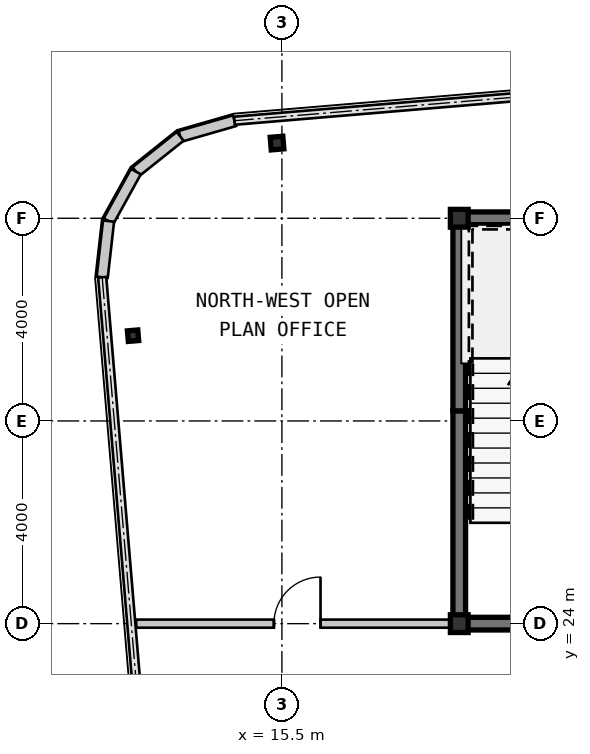
"""IFC4 building model, lengths in metres.
Left out: names, types, materials, properties, quantities, classifications, styles, units other than length and angle.
Written with IfcOpenShell. Run it as: python <this file> out.ifc"""

import sys

from ifc_helpers import new_model, si_unit, direction, frame, frame_2d, origin, origin_2d, place, context, subcontext, project, spatial, rectangle, hollow_rectangle, i_section, extrude, source, transform, mapped, element, fill, save


model = new_model("IFC4")
c1 = context("Model", 3, precision=1e-05, world=origin(), true_north=direction((0.0, 1.0)))
c2 = subcontext(c1, "Body", "Model", "MODEL_VIEW")
j1 = project(units=[si_unit("LENGTHUNIT", "METRE"), si_unit("PLANEANGLEUNIT", "RADIAN")], contexts=[c1])
p1 = place(None, origin())
s1 = spatial("IfcSite", under=j1, at=p1, CompositionType="ELEMENT")
p2 = place(p1, origin())
s2 = spatial("IfcBuilding", under=s1, at=p2, CompositionType="ELEMENT")
p3 = place(p2, frame((0.0, 0.0, 185.15)))
s3 = spatial("IfcBuildingStorey", under=s2, at=p3, CompositionType="ELEMENT", Elevation=185.15)
m1 = source(origin(), c2, "Body", "SweptSolid", [
    extrude(hollow_rectangle(XDim=0.35, YDim=0.35, WallThickness=0.016, at=origin_2d()), origin(), (0.0, 0.0, 1.0), 3.15),
])
for number, where, z_axis, x_axis in (
    (1, (19.0, 24.0, 0.0), (0.0, 0.0, 1.0), (1.0, 0.0, 0.0)),
    (2, (19.0, 32.0, 0.0), (0.0, 0.0, 1.0), (1.0, 0.0, 0.0)),
):
    element("IfcColumn", number, at=place(p3, frame(where, z_axis=z_axis, x_axis=x_axis)), inside=s3, PredefinedType="COLUMN", context=c2, shape_type="MappedRepresentation", body=[
        mapped(m1, transform((0.0, 0.0, 0.0), scale=1.0)),
    ])
m2 = source(origin(), c2, "Body", "SweptSolid", [
    extrude(hollow_rectangle(XDim=0.25, YDim=0.25, WallThickness=0.01, at=origin_2d()), origin(), (0.0, 0.0, 1.0), 3.15),
])
p4 = place(p3, frame((15.404, 33.484, 0.0), z_axis=(0.0, 0.0, 1.0), x_axis=(0.99649285925, 0.083677843332, 0.0)))
e3 = element("IfcColumn", 3, at=p4, inside=s3, PredefinedType="COLUMN", context=c2, shape_type="MappedRepresentation", body=[
    mapped(m2, transform((0.0, 0.0, 0.0), scale=1.0)),
])
m3 = source(origin(), c2, "Body", "SweptSolid", [
    extrude(i_section(OverallWidth=0.205, OverallDepth=0.21, WebThickness=0.009, FlangeThickness=0.014, at=origin_2d()), origin(), (0.0, 0.0, 1.0), 3.15),
])
p5 = place(p3, frame((12.562, 29.682, 0.0), z_axis=(0.0, 0.0, 1.0), x_axis=(0.99649285925, 0.083677843332, 0.0)))
e4 = element("IfcColumn", 4, at=p5, inside=s3, PredefinedType="COLUMN", context=c2, shape_type="MappedRepresentation", body=[
    mapped(m3, transform((0.0, 0.0, 0.0), scale=1.0)),
])
m4 = source(origin(), c2, "Body", "SweptSolid", [
    extrude(rectangle(XDim=1.116, YDim=0.22, at=frame_2d((0.558, 0.0))), origin(), (0.0, 0.0, 1.0), 2.93),
])
p6 = place(p3, frame((14.564, 33.925, 0.0), z_axis=(0.0, 0.0, 1.0), x_axis=(-0.961010464297, -0.276512002475, 0.0)))
e5 = element("IfcWall", 5, at=p6, inside=s3, PredefinedType="SOLIDWALL", context=c2, shape_type="MappedRepresentation", body=[
    mapped(m4, transform((0.0, 0.0, 0.0), scale=1.0)),
])
m5 = source(origin(), c2, "Body", "SweptSolid", [
    extrude(rectangle(XDim=1.116, YDim=0.22, at=frame_2d((0.558, 0.0))), origin(), (0.0, 0.0, 1.0), 2.93),
])
p7 = place(p3, frame((13.491, 33.616, 0.0), z_axis=(0.0, 0.0, 1.0), x_axis=(-0.782062884215, -0.623199522732, 0.0)))
e6 = element("IfcWall", 6, at=p7, inside=s3, PredefinedType="SOLIDWALL", context=c2, shape_type="MappedRepresentation", body=[
    mapped(m5, transform((0.0, 0.0, 0.0), scale=1.0)),
])
for number, where, z_axis, x_axis in (
    (7, (12.619, 32.921, 0.0), (0.0, 0.0, 1.0), (-0.484, -0.875, 0.0)),
    (8, (12.079, 31.944, 0.0), (0.0, 0.0, 1.0), (-0.112, -0.994, 0.0)),
):
    element("IfcWall", number, at=place(p3, frame(where, z_axis=z_axis, x_axis=x_axis)), inside=s3, PredefinedType="SOLIDWALL", context=c2, shape_type="MappedRepresentation", body=[
        mapped(m4, transform((0.0, 0.0, 0.0), scale=1.0)),
    ])
m6 = source(origin(), c2, "Body", "SweptSolid", [
    extrude(rectangle(XDim=9.125, YDim=0.25, at=frame_2d((4.562, 0.0))), origin(), (0.0, 0.0, 1.0), 2.93),
])
p8 = place(p3, frame((18.875, 32.0, 0.0), z_axis=(0.0, 0.0, 1.0), x_axis=(1.0, 0.0, 0.0)))
e9 = element("IfcWall", 9, at=p8, inside=s3, PredefinedType="SHEAR", context=c2, shape_type="MappedRepresentation", body=[
    mapped(m6, transform((0.0, 0.0, 0.0), scale=1.0)),
])
m7 = source(origin(), c2, "Body", "SweptSolid", [
    extrude(rectangle(XDim=4.075, YDim=0.25, at=frame_2d((2.038, 0.0))), origin(), (0.0, 0.0, 1.0), 2.93),
])
p9 = place(p3, frame((19.0, 24.125, 0.0), z_axis=(0.0, 0.0, 1.0), x_axis=(0.0, 1.0, 0.0)))
e10 = element("IfcWall", 10, at=p9, inside=s3, PredefinedType="SHEAR", context=c2, shape_type="MappedRepresentation", body=[
    mapped(m7, transform((0.0, 0.0, 0.0), scale=1.0)),
])
m8 = source(origin(), c2, "Body", "SweptSolid", [
    extrude(rectangle(XDim=3.675, YDim=0.25, at=frame_2d((1.837, 0.0))), origin(), (0.0, 0.0, 1.0), 2.93),
])
p10 = place(p3, frame((19.0, 28.2, 0.0), z_axis=(0.0, 0.0, 1.0), x_axis=(0.0, 1.0, 0.0)))
e11 = element("IfcWall", 11, at=p10, inside=s3, PredefinedType="SHEAR", context=c2, shape_type="MappedRepresentation", body=[
    mapped(m8, transform((0.0, 0.0, 0.0), scale=1.0)),
])
m9 = source(origin(), c2, "Body", "SweptSolid", [
    extrude(rectangle(XDim=4.85, YDim=0.25, at=frame_2d((2.425, 0.0))), origin(), (0.0, 0.0, 1.0), 2.93),
])
p11 = place(p3, frame((18.875, 24.0, 0.0), z_axis=(0.0, 0.0, 1.0), x_axis=(1.0, 0.0, 0.0)))
e12 = element("IfcWall", 12, at=p11, inside=s3, PredefinedType="SHEAR", context=c2, shape_type="MappedRepresentation", body=[
    mapped(m9, transform((0.0, 0.0, 0.0), scale=1.0)),
])
m10 = source(origin(), c2, "Body", "SweptSolid", [
    extrude(rectangle(XDim=6.251, YDim=0.16, at=frame_2d((3.125, 0.0))), origin(), (0.0, 0.0, 1.0), 2.93),
])
p12 = place(p3, frame((12.624, 24.0, 0.0), z_axis=(0.0, 0.0, 1.0), x_axis=(1.0, 0.0, 0.0)))
e13 = element("IfcWall", 13, at=p12, inside=s3, PredefinedType="PARTITIONING", context=c2, shape_type="MappedRepresentation", body=[
    mapped(m10, transform((0.0, 0.0, 0.0), scale=1.0)),
])
m11 = source(origin(), c2, "Body", "SweptSolid", [
    extrude(rectangle(XDim=0.92, YDim=2.1, at=frame_2d((0.46, 1.05))), frame((0.0, 0.09, 0.0), z_axis=(0.0, -1.0, 0.0), x_axis=(1.0, 0.0, 0.0)), (0.0, 0.0, 1.0), 0.18),
])
p13 = place(p12, frame((2.718, 0.0, 0.0)))
e14 = element("IfcOpeningElement", 14, at=p13, cuts=e13, PredefinedType="OPENING", context=c2, shape_type="MappedRepresentation", body=[
    mapped(m11, transform((0.0, 0.0, 0.0), scale=1.0)),
])
m12 = source(origin(), c2, "Body", "SweptSolid", [
    extrude(rectangle(XDim=0.92, YDim=2.1, at=frame_2d((0.46, 1.05))), frame((0.0, 0.025, 0.0), z_axis=(0.0, -1.0, 0.0), x_axis=(1.0, 0.0, 0.0)), (0.0, 0.0, 1.0), 0.05),
])
p14 = place(p13, origin())
e15 = element("IfcDoor", 15, at=p14, inside=s3, OperationType="SINGLE_SWING_RIGHT", PredefinedType="DOOR", context=c2, shape_type="MappedRepresentation", body=[
    mapped(m12, transform((0.0, 0.0, 0.0), scale=1.0)),
])
fill(e14, e15)
save(model, sys.argv[1])
